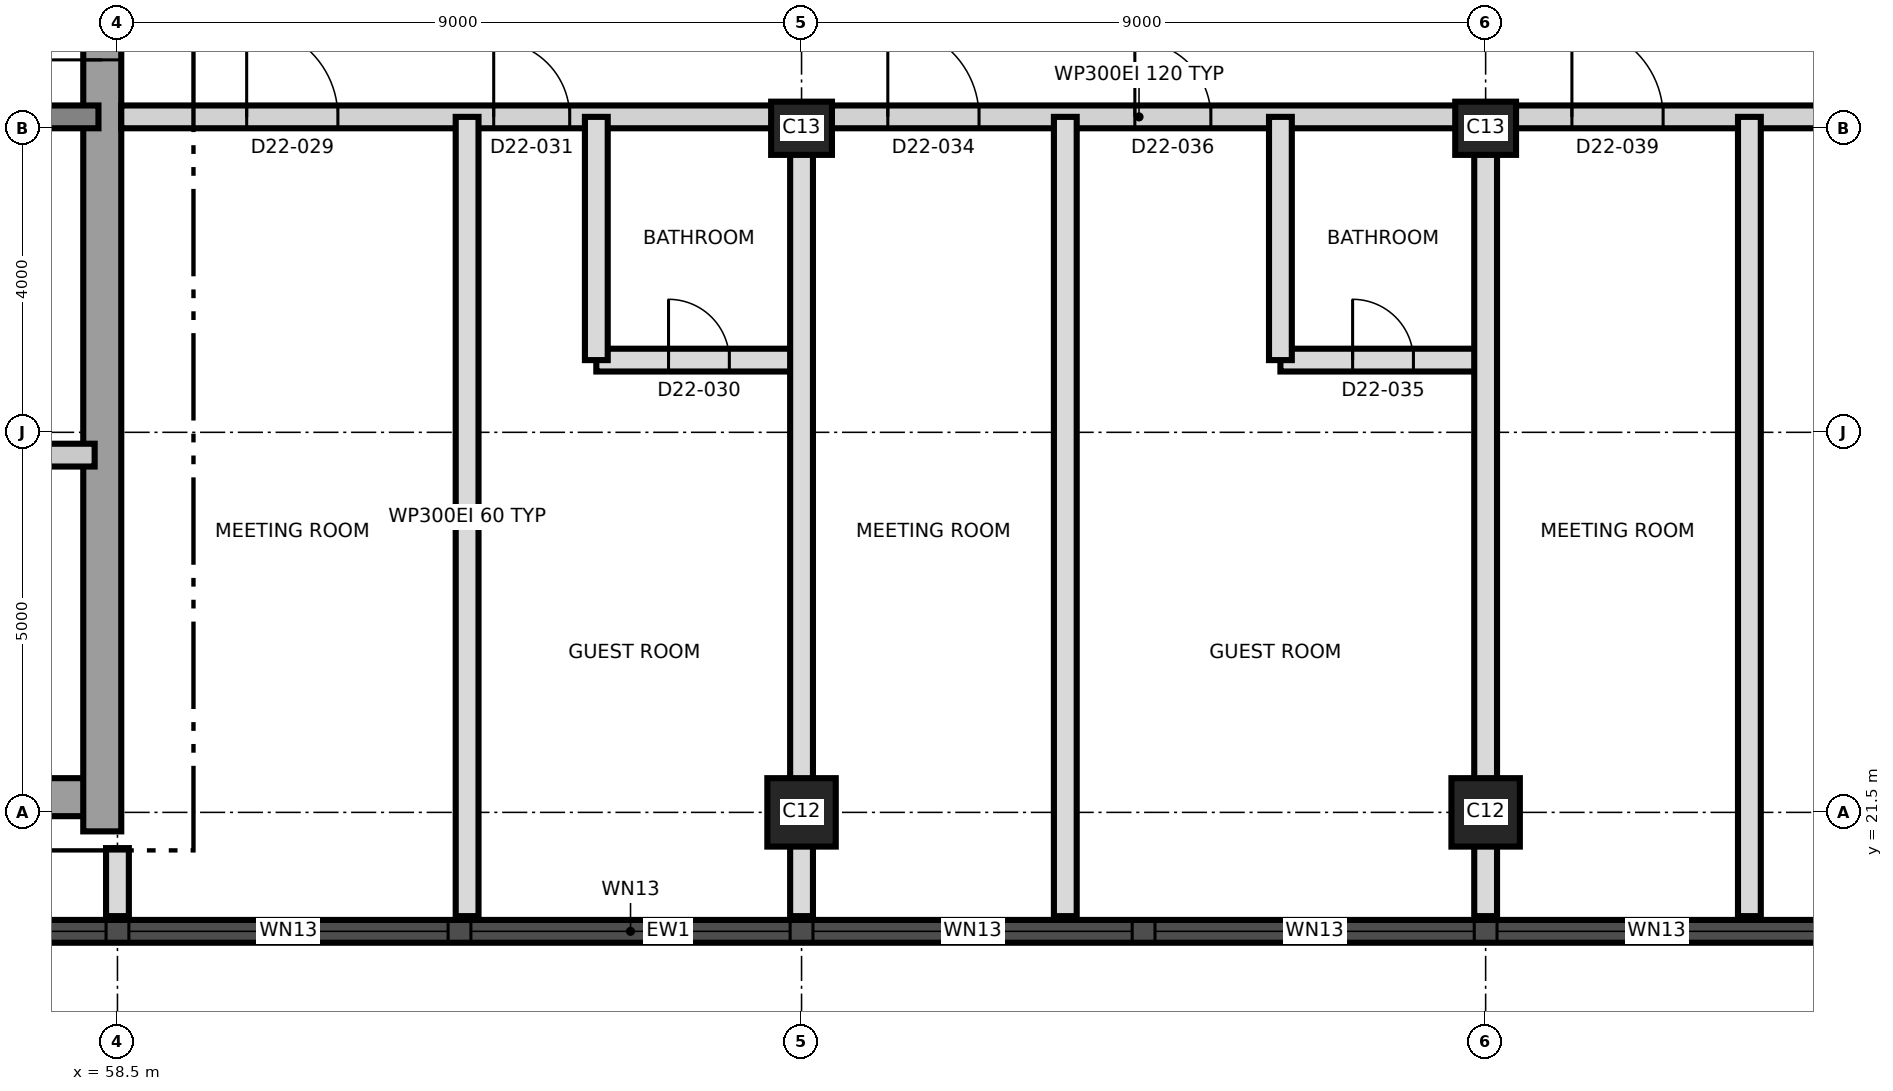
"""IFC4 building model, lengths in metres.
Left out: names, types, materials, properties, quantities, classifications, styles, units other than length and angle.
Written with IfcOpenShell. Run it as: python <this file> out.ifc"""

import sys

from ifc_helpers import new_model, si_unit, direction, frame, frame_2d, origin, origin_2d, place, context, subcontext, project, spatial, rectangle, extrude, element, fill, save


model = new_model("IFC4")
c1 = context("Model", 3, precision=1e-05, world=origin(), true_north=direction((0.0, 1.0)))
c2 = subcontext(c1, "Body", "Model", "MODEL_VIEW")
j1 = project(units=[si_unit("LENGTHUNIT", "METRE"), si_unit("PLANEANGLEUNIT", "RADIAN")], contexts=[c1])
p1 = place(None, origin())
s1 = spatial("IfcSite", under=j1, at=p1, CompositionType="ELEMENT")
p2 = place(p1, origin())
s2 = spatial("IfcBuilding", under=s1, at=p2, CompositionType="ELEMENT")
p3 = place(p2, frame((0.0, 0.0, 203.2)))
s3 = spatial("IfcBuildingStorey", under=s2, at=p3, CompositionType="ELEMENT", Elevation=203.2)
p4 = place(p3, frame((31.25, 21.7, 0.0), z_axis=(0.0, 0.0, 1.0), x_axis=(1.0, 0.0, 0.0)))
e1 = element("IfcWall", 1, at=p4, inside=s3, PredefinedType="SHEAR", context=c2, shape_type="SweptSolid", body=[
    extrude(rectangle(XDim=27.0, YDim=0.5, at=frame_2d((13.5, 0.0))), origin(), (0.0, 0.0, 1.0), 3.7),
])
p5 = place(p3, frame((58.3, 21.25, 0.0), z_axis=(0.0, 0.0, 1.0), x_axis=(0.0, 1.0, 0.0)))
e2 = element("IfcWall", 2, at=p5, inside=s3, PredefinedType="SHEAR", context=c2, shape_type="SweptSolid", body=[
    extrude(rectangle(XDim=18.5, YDim=0.5, at=frame_2d((9.25, 0.0))), origin(), (0.0, 0.0, 1.0), 3.7),
])
p6 = place(p5, frame((10.15, 0.0, 0.0)))
e3 = element("IfcOpeningElement", 3, at=p6, cuts=e2, PredefinedType="OPENING", context=c2, shape_type="SweptSolid", body=[
    extrude(rectangle(XDim=1.2, YDim=2.1, at=frame_2d((0.6, 1.05))), frame((0.0, 0.26, 0.0), z_axis=(0.0, -1.0, 0.0), x_axis=(1.0, 0.0, 0.0)), (0.0, 0.0, 1.0), 0.52),
])
p7 = place(p3, frame((31.75, 30.65, 0.0), z_axis=(0.0, 0.0, 1.0), x_axis=(1.0, 0.0, 0.0)))
e4 = element("IfcWall", 4, at=p7, inside=s3, PredefinedType="SHEAR", context=c2, shape_type="SweptSolid", body=[
    extrude(rectangle(XDim=26.5, YDim=0.3, at=frame_2d((13.25, 0.0))), origin(), (0.0, 0.0, 1.0), 3.7),
])
p8 = place(p7, frame((24.75, 0.0, 0.0)))
e5 = element("IfcOpeningElement", 5, at=p8, cuts=e4, PredefinedType="OPENING", context=c2, shape_type="SweptSolid", body=[
    extrude(rectangle(XDim=1.0, YDim=2.1, at=frame_2d((0.5, 1.05))), frame((0.0, 0.16, 0.0), z_axis=(0.0, -1.0, 0.0), x_axis=(1.0, 0.0, 0.0)), (0.0, 0.0, 1.0), 0.32),
])
p9 = place(p7, frame((4.05, 0.0, 0.0)))
e6 = element("IfcOpeningElement", 6, at=p9, cuts=e4, PredefinedType="OPENING", context=c2, shape_type="SweptSolid", body=[
    extrude(rectangle(XDim=1.0, YDim=2.1, at=frame_2d((0.5, 1.05))), frame((0.0, 0.16, 0.0), z_axis=(0.0, -1.0, 0.0), x_axis=(1.0, 0.0, 0.0)), (0.0, 0.0, 1.0), 0.32),
])
for number, where, z_axis, x_axis in (
    (7, (67.5, 21.5, 0.0), (0.0, 0.0, 1.0), (1.0, 0.0, 0.0)),
    (8, (76.5, 21.5, 0.0), (0.0, 0.0, 1.0), (1.0, 0.0, 0.0)),
):
    element("IfcColumn", number, at=place(p3, frame(where, z_axis=z_axis, x_axis=x_axis)), inside=s3, PredefinedType="COLUMN", context=c2, shape_type="SweptSolid", body=[
        extrude(rectangle(XDim=0.9, YDim=0.9, at=origin_2d()), origin(), (0.0, 0.0, 1.0), 3.7),
    ])
for number, where, z_axis, x_axis in (
    (9, (67.5, 30.5, 0.0), (0.0, 0.0, 1.0), (1.0, 0.0, 0.0)),
    (10, (76.5, 30.5, 0.0), (0.0, 0.0, 1.0), (1.0, 0.0, 0.0)),
):
    element("IfcColumn", number, at=place(p3, frame(where, z_axis=z_axis, x_axis=x_axis)), inside=s3, PredefinedType="COLUMN", context=c2, shape_type="SweptSolid", body=[
        extrude(rectangle(XDim=0.8, YDim=0.7, at=origin_2d()), origin(), (0.0, 0.0, 1.0), 3.7),
    ])
p10 = place(p3, frame((44.01, 19.935, 0.0), z_axis=(0.0, 0.0, 1.0), x_axis=(1.0, 0.0, 0.0)))
e11 = element("IfcWall", 11, at=p10, inside=s3, PredefinedType="SOLIDWALL", context=c2, shape_type="SweptSolid", body=[
    extrude(rectangle(XDim=43.477, YDim=0.3, at=frame_2d((21.738, 0.0))), origin(), (0.0, 0.0, 1.0), 3.4),
])
p11 = place(p10, frame((1.845, 0.0, 0.3)))
e12 = element("IfcOpeningElement", 12, at=p11, cuts=e11, PredefinedType="OPENING", context=c2, shape_type="SweptSolid", body=[
    extrude(rectangle(XDim=1.8, YDim=2.4, at=frame_2d((0.9, 1.2))), frame((0.0, 0.16, 0.0), z_axis=(0.0, -1.0, 0.0), x_axis=(1.0, 0.0, 0.0)), (0.0, 0.0, 1.0), 0.32),
])
p12 = place(p10, frame((5.64, 0.0, 0.9)))
e13 = element("IfcOpeningElement", 13, at=p12, cuts=e11, PredefinedType="OPENING", context=c2, shape_type="SweptSolid", body=[
    extrude(rectangle(XDim=4.2, YDim=1.7, at=frame_2d((2.1, 0.85))), frame((0.0, 0.16, 0.0), z_axis=(0.0, -1.0, 0.0), x_axis=(1.0, 0.0, 0.0)), (0.0, 0.0, 1.0), 0.32),
])
p13 = place(p10, frame((10.14, 0.0, 0.9)))
e14 = element("IfcOpeningElement", 14, at=p13, cuts=e11, PredefinedType="OPENING", context=c2, shape_type="SweptSolid", body=[
    extrude(rectangle(XDim=4.2, YDim=1.7, at=frame_2d((2.1, 0.85))), frame((0.0, 0.16, 0.0), z_axis=(0.0, -1.0, 0.0), x_axis=(1.0, 0.0, 0.0)), (0.0, 0.0, 1.0), 0.32),
])
p14 = place(p10, frame((14.64, 0.0, 0.9)))
e15 = element("IfcOpeningElement", 15, at=p14, cuts=e11, PredefinedType="OPENING", context=c2, shape_type="SweptSolid", body=[
    extrude(rectangle(XDim=4.2, YDim=1.7, at=frame_2d((2.1, 0.85))), frame((0.0, 0.16, 0.0), z_axis=(0.0, -1.0, 0.0), x_axis=(1.0, 0.0, 0.0)), (0.0, 0.0, 1.0), 0.32),
])
p15 = place(p10, frame((19.14, 0.0, 0.9)))
e16 = element("IfcOpeningElement", 16, at=p15, cuts=e11, PredefinedType="OPENING", context=c2, shape_type="SweptSolid", body=[
    extrude(rectangle(XDim=4.2, YDim=1.7, at=frame_2d((2.1, 0.85))), frame((0.0, 0.16, 0.0), z_axis=(0.0, -1.0, 0.0), x_axis=(1.0, 0.0, 0.0)), (0.0, 0.0, 1.0), 0.32),
])
p16 = place(p10, frame((23.64, 0.0, 0.9)))
e17 = element("IfcOpeningElement", 17, at=p16, cuts=e11, PredefinedType="OPENING", context=c2, shape_type="SweptSolid", body=[
    extrude(rectangle(XDim=4.2, YDim=1.7, at=frame_2d((2.1, 0.85))), frame((0.0, 0.16, 0.0), z_axis=(0.0, -1.0, 0.0), x_axis=(1.0, 0.0, 0.0)), (0.0, 0.0, 1.0), 0.32),
])
p17 = place(p10, frame((28.14, 0.0, 0.9)))
e18 = element("IfcOpeningElement", 18, at=p17, cuts=e11, PredefinedType="OPENING", context=c2, shape_type="SweptSolid", body=[
    extrude(rectangle(XDim=4.2, YDim=1.7, at=frame_2d((2.1, 0.85))), frame((0.0, 0.16, 0.0), z_axis=(0.0, -1.0, 0.0), x_axis=(1.0, 0.0, 0.0)), (0.0, 0.0, 1.0), 0.32),
])
p18 = place(p10, frame((32.64, 0.0, 0.9)))
e19 = element("IfcOpeningElement", 19, at=p18, cuts=e11, PredefinedType="OPENING", context=c2, shape_type="SweptSolid", body=[
    extrude(rectangle(XDim=4.2, YDim=1.7, at=frame_2d((2.1, 0.85))), frame((0.0, 0.16, 0.0), z_axis=(0.0, -1.0, 0.0), x_axis=(1.0, 0.0, 0.0)), (0.0, 0.0, 1.0), 0.32),
])
p19 = place(p10, frame((37.14, 0.0, 0.9)))
e20 = element("IfcOpeningElement", 20, at=p19, cuts=e11, PredefinedType="OPENING", context=c2, shape_type="SweptSolid", body=[
    extrude(rectangle(XDim=4.2, YDim=1.7, at=frame_2d((2.1, 0.85))), frame((0.0, 0.16, 0.0), z_axis=(0.0, -1.0, 0.0), x_axis=(1.0, 0.0, 0.0)), (0.0, 0.0, 1.0), 0.32),
])
p20 = place(p3, frame((55.8, 26.2, 0.0), z_axis=(0.0, 0.0, 1.0), x_axis=(1.0, 0.0, 0.0)))
e21 = element("IfcWall", 21, at=p20, inside=s3, PredefinedType="PARTITIONING", context=c2, shape_type="SweptSolid", body=[
    extrude(rectangle(XDim=2.4, YDim=0.3, at=frame_2d((1.2, 0.0))), origin(), (0.0, 0.0, 1.0), 3.4),
])
p21 = place(p20, frame((0.75, 0.0, 0.0)))
e22 = element("IfcOpeningElement", 22, at=p21, cuts=e21, PredefinedType="OPENING", context=c2, shape_type="SweptSolid", body=[
    extrude(rectangle(XDim=0.9, YDim=2.1, at=frame_2d((0.45, 1.05))), frame((0.0, 0.16, 0.0), z_axis=(0.0, -1.0, 0.0), x_axis=(1.0, 0.0, 0.0)), (0.0, 0.0, 1.0), 0.32),
])
p22 = place(p3, frame((64.8, 27.45, 0.0), z_axis=(0.0, 0.0, 1.0), x_axis=(1.0, 0.0, 0.0)))
e23 = element("IfcWall", 23, at=p22, inside=s3, PredefinedType="PARTITIONING", context=c2, shape_type="SweptSolid", body=[
    extrude(rectangle(XDim=2.7, YDim=0.3, at=frame_2d((1.35, 0.0))), origin(), (0.0, 0.0, 1.0), 3.4),
])
p23 = place(p22, frame((0.95, 0.0, 0.0)))
e24 = element("IfcOpeningElement", 24, at=p23, cuts=e23, PredefinedType="OPENING", context=c2, shape_type="SweptSolid", body=[
    extrude(rectangle(XDim=0.8, YDim=2.1, at=frame_2d((0.4, 1.05))), frame((0.0, 0.16, 0.0), z_axis=(0.0, -1.0, 0.0), x_axis=(1.0, 0.0, 0.0)), (0.0, 0.0, 1.0), 0.32),
])
p24 = place(p3, frame((73.8, 27.45, 0.0), z_axis=(0.0, 0.0, 1.0), x_axis=(1.0, 0.0, 0.0)))
e25 = element("IfcWall", 25, at=p24, inside=s3, PredefinedType="PARTITIONING", context=c2, shape_type="SweptSolid", body=[
    extrude(rectangle(XDim=2.7, YDim=0.3, at=frame_2d((1.35, 0.0))), origin(), (0.0, 0.0, 1.0), 3.4),
])
p25 = place(p24, frame((0.95, 0.0, 0.0)))
e26 = element("IfcOpeningElement", 26, at=p25, cuts=e25, PredefinedType="OPENING", context=c2, shape_type="SweptSolid", body=[
    extrude(rectangle(XDim=0.8, YDim=2.1, at=frame_2d((0.4, 1.05))), frame((0.0, 0.16, 0.0), z_axis=(0.0, -1.0, 0.0), x_axis=(1.0, 0.0, 0.0)), (0.0, 0.0, 1.0), 0.32),
])
p26 = place(p3, frame((58.55, 30.65, 0.0), z_axis=(0.0, 0.0, 1.0), x_axis=(1.0, 0.0, 0.0)))
e27 = element("IfcWall", 27, at=p26, inside=s3, PredefinedType="PARTITIONING", context=c2, shape_type="SweptSolid", body=[
    extrude(rectangle(XDim=26.78, YDim=0.3, at=frame_2d((13.39, 0.0))), origin(), (0.0, 0.0, 1.0), 3.4),
])
p27 = place(p26, frame((1.65, 0.0, 0.0)))
e28 = element("IfcOpeningElement", 28, at=p27, cuts=e27, PredefinedType="OPENING", context=c2, shape_type="SweptSolid", body=[
    extrude(rectangle(XDim=1.2, YDim=2.1, at=frame_2d((0.6, 1.05))), frame((0.0, 0.16, 0.0), z_axis=(0.0, -1.0, 0.0), x_axis=(1.0, 0.0, 0.0)), (0.0, 0.0, 1.0), 0.32),
])
p28 = place(p26, frame((4.9, 0.0, 0.0)))
e29 = element("IfcOpeningElement", 29, at=p28, cuts=e27, PredefinedType="OPENING", context=c2, shape_type="SweptSolid", body=[
    extrude(rectangle(XDim=1.0, YDim=2.1, at=frame_2d((0.5, 1.05))), frame((0.0, 0.16, 0.0), z_axis=(0.0, -1.0, 0.0), x_axis=(1.0, 0.0, 0.0)), (0.0, 0.0, 1.0), 0.32),
])
p29 = place(p26, frame((10.085, 0.0, 0.0)))
e30 = element("IfcOpeningElement", 30, at=p29, cuts=e27, PredefinedType="OPENING", context=c2, shape_type="SweptSolid", body=[
    extrude(rectangle(XDim=1.2, YDim=2.1, at=frame_2d((0.6, 1.05))), frame((0.0, 0.16, 0.0), z_axis=(0.0, -1.0, 0.0), x_axis=(1.0, 0.0, 0.0)), (0.0, 0.0, 1.0), 0.32),
])
p30 = place(p26, frame((13.335, 0.0, 0.0)))
e31 = element("IfcOpeningElement", 31, at=p30, cuts=e27, PredefinedType="OPENING", context=c2, shape_type="SweptSolid", body=[
    extrude(rectangle(XDim=1.0, YDim=2.1, at=frame_2d((0.5, 1.05))), frame((0.0, 0.16, 0.0), z_axis=(0.0, -1.0, 0.0), x_axis=(1.0, 0.0, 0.0)), (0.0, 0.0, 1.0), 0.32),
])
p31 = place(p26, frame((19.085, 0.0, 0.0)))
e32 = element("IfcOpeningElement", 32, at=p31, cuts=e27, PredefinedType="OPENING", context=c2, shape_type="SweptSolid", body=[
    extrude(rectangle(XDim=1.2, YDim=2.1, at=frame_2d((0.6, 1.05))), frame((0.0, 0.16, 0.0), z_axis=(0.0, -1.0, 0.0), x_axis=(1.0, 0.0, 0.0)), (0.0, 0.0, 1.0), 0.32),
])
p32 = place(p26, frame((22.335, 0.0, 0.0)))
e33 = element("IfcOpeningElement", 33, at=p32, cuts=e27, PredefinedType="OPENING", context=c2, shape_type="SweptSolid", body=[
    extrude(rectangle(XDim=1.0, YDim=2.1, at=frame_2d((0.5, 1.05))), frame((0.0, 0.16, 0.0), z_axis=(0.0, -1.0, 0.0), x_axis=(1.0, 0.0, 0.0)), (0.0, 0.0, 1.0), 0.32),
])
p33 = place(p3, frame((58.5, 20.135, 0.0), z_axis=(0.0, 0.0, 1.0), x_axis=(0.0, 1.0, 0.0)))
e34 = element("IfcWall", 34, at=p33, inside=s3, PredefinedType="PARTITIONING", context=c2, shape_type="SweptSolid", body=[
    extrude(rectangle(XDim=0.895, YDim=0.3, at=frame_2d((0.448, 0.0))), origin(), (0.0, 0.0, 1.0), 3.35),
])
p34 = place(p3, frame((63.1, 20.135, 0.0), z_axis=(0.0, 0.0, 1.0), x_axis=(0.0, 1.0, 0.0)))
e35 = element("IfcWall", 35, at=p34, inside=s3, PredefinedType="PARTITIONING", context=c2, shape_type="SweptSolid", body=[
    extrude(rectangle(XDim=10.515, YDim=0.3, at=frame_2d((5.257, 0.0))), origin(), (0.0, 0.0, 1.0), 3.35),
])
p35 = place(p3, frame((64.8, 27.45, 0.0), z_axis=(0.0, 0.0, 1.0), x_axis=(0.0, 1.0, 0.0)))
e36 = element("IfcWall", 36, at=p35, inside=s3, PredefinedType="PARTITIONING", context=c2, shape_type="SweptSolid", body=[
    extrude(rectangle(XDim=3.2, YDim=0.3, at=frame_2d((1.6, 0.0))), origin(), (0.0, 0.0, 1.0), 3.4),
])
for number, where, z_axis, x_axis in (
    (37, (67.5, 20.135, 0.0), (0.0, 0.0, 1.0), (0.0, 1.0, 0.0)),
    (38, (70.97, 20.135, 0.0), (0.0, 0.0, 1.0), (0.0, 1.0, 0.0)),
):
    element("IfcWall", number, at=place(p3, frame(where, z_axis=z_axis, x_axis=x_axis)), inside=s3, PredefinedType="PARTITIONING", context=c2, shape_type="SweptSolid", body=[
        extrude(rectangle(XDim=10.515, YDim=0.3, at=frame_2d((5.257, 0.0))), origin(), (0.0, 0.0, 1.0), 3.35),
    ])
p36 = place(p3, frame((73.8, 27.45, 0.0), z_axis=(0.0, 0.0, 1.0), x_axis=(0.0, 1.0, 0.0)))
e39 = element("IfcWall", 39, at=p36, inside=s3, PredefinedType="PARTITIONING", context=c2, shape_type="SweptSolid", body=[
    extrude(rectangle(XDim=3.2, YDim=0.3, at=frame_2d((1.6, 0.0))), origin(), (0.0, 0.0, 1.0), 3.4),
])
for number, where, z_axis, x_axis in (
    (40, (76.5, 20.135, 0.0), (0.0, 0.0, 1.0), (0.0, 1.0, 0.0)),
    (41, (79.97, 20.135, 0.0), (0.0, 0.0, 1.0), (0.0, 1.0, 0.0)),
):
    element("IfcWall", number, at=place(p3, frame(where, z_axis=z_axis, x_axis=x_axis)), inside=s3, PredefinedType="PARTITIONING", context=c2, shape_type="SweptSolid", body=[
        extrude(rectangle(XDim=10.515, YDim=0.3, at=frame_2d((5.257, 0.0))), origin(), (0.0, 0.0, 1.0), 3.35),
    ])
p37 = place(p13, origin())
e42 = element("IfcWindow", 42, at=p37, inside=s3, PartitioningType="SINGLE_PANEL", PredefinedType="WINDOW", context=c2, shape_type="SweptSolid", body=[
    extrude(rectangle(XDim=4.2, YDim=1.7, at=frame_2d((2.1, 0.85))), frame((0.0, 0.03, 0.0), z_axis=(0.0, -1.0, 0.0), x_axis=(1.0, 0.0, 0.0)), (0.0, 0.0, 1.0), 0.06),
])
fill(e14, e42)
p38 = place(p14, origin())
e43 = element("IfcWindow", 43, at=p38, inside=s3, PartitioningType="SINGLE_PANEL", PredefinedType="WINDOW", context=c2, shape_type="SweptSolid", body=[
    extrude(rectangle(XDim=4.2, YDim=1.7, at=frame_2d((2.1, 0.85))), frame((0.0, 0.03, 0.0), z_axis=(0.0, -1.0, 0.0), x_axis=(1.0, 0.0, 0.0)), (0.0, 0.0, 1.0), 0.06),
])
fill(e15, e43)
p39 = place(p15, origin())
e44 = element("IfcWindow", 44, at=p39, inside=s3, PartitioningType="SINGLE_PANEL", PredefinedType="WINDOW", context=c2, shape_type="SweptSolid", body=[
    extrude(rectangle(XDim=4.2, YDim=1.7, at=frame_2d((2.1, 0.85))), frame((0.0, 0.03, 0.0), z_axis=(0.0, -1.0, 0.0), x_axis=(1.0, 0.0, 0.0)), (0.0, 0.0, 1.0), 0.06),
])
fill(e16, e44)
p40 = place(p16, origin())
e45 = element("IfcWindow", 45, at=p40, inside=s3, PartitioningType="SINGLE_PANEL", PredefinedType="WINDOW", context=c2, shape_type="SweptSolid", body=[
    extrude(rectangle(XDim=4.2, YDim=1.7, at=frame_2d((2.1, 0.85))), frame((0.0, 0.03, 0.0), z_axis=(0.0, -1.0, 0.0), x_axis=(1.0, 0.0, 0.0)), (0.0, 0.0, 1.0), 0.06),
])
fill(e17, e45)
p41 = place(p17, origin())
e46 = element("IfcWindow", 46, at=p41, inside=s3, PartitioningType="SINGLE_PANEL", PredefinedType="WINDOW", context=c2, shape_type="SweptSolid", body=[
    extrude(rectangle(XDim=4.2, YDim=1.7, at=frame_2d((2.1, 0.85))), frame((0.0, 0.03, 0.0), z_axis=(0.0, -1.0, 0.0), x_axis=(1.0, 0.0, 0.0)), (0.0, 0.0, 1.0), 0.06),
])
fill(e18, e46)
p42 = place(p18, origin())
e47 = element("IfcWindow", 47, at=p42, inside=s3, PartitioningType="SINGLE_PANEL", PredefinedType="WINDOW", context=c2, shape_type="SweptSolid", body=[
    extrude(rectangle(XDim=4.2, YDim=1.7, at=frame_2d((2.1, 0.85))), frame((0.0, 0.03, 0.0), z_axis=(0.0, -1.0, 0.0), x_axis=(1.0, 0.0, 0.0)), (0.0, 0.0, 1.0), 0.06),
])
fill(e19, e47)
p43 = place(p6, origin())
e48 = element("IfcDoor", 48, at=p43, inside=s3, OperationType="SINGLE_SWING_LEFT", PredefinedType="DOOR", context=c2, shape_type="SweptSolid", body=[
    extrude(rectangle(XDim=1.2, YDim=2.1, at=frame_2d((0.6, 1.05))), frame((0.0, 0.025, 0.0), z_axis=(0.0, -1.0, 0.0), x_axis=(1.0, 0.0, 0.0)), (0.0, 0.0, 1.0), 0.05),
])
fill(e3, e48)
p44 = place(p27, origin())
e49 = element("IfcDoor", 49, at=p44, inside=s3, OperationType="SINGLE_SWING_LEFT", PredefinedType="DOOR", context=c2, shape_type="SweptSolid", body=[
    extrude(rectangle(XDim=1.2, YDim=2.1, at=frame_2d((0.6, 1.05))), frame((0.0, 0.025, 0.0), z_axis=(0.0, -1.0, 0.0), x_axis=(1.0, 0.0, 0.0)), (0.0, 0.0, 1.0), 0.05),
])
fill(e28, e49)
p45 = place(p23, origin())
e50 = element("IfcDoor", 50, at=p45, inside=s3, OperationType="SINGLE_SWING_RIGHT", PredefinedType="DOOR", context=c2, shape_type="SweptSolid", body=[
    extrude(rectangle(XDim=0.8, YDim=2.1, at=frame_2d((0.4, 1.05))), frame((0.0, 0.025, 0.0), z_axis=(0.0, -1.0, 0.0), x_axis=(1.0, 0.0, 0.0)), (0.0, 0.0, 1.0), 0.05),
])
fill(e24, e50)
p46 = place(p28, origin())
e51 = element("IfcDoor", 51, at=p46, inside=s3, OperationType="SINGLE_SWING_LEFT", PredefinedType="DOOR", context=c2, shape_type="SweptSolid", body=[
    extrude(rectangle(XDim=1.0, YDim=2.1, at=frame_2d((0.5, 1.05))), frame((0.0, 0.025, 0.0), z_axis=(0.0, -1.0, 0.0), x_axis=(1.0, 0.0, 0.0)), (0.0, 0.0, 1.0), 0.05),
])
fill(e29, e51)
p47 = place(p29, origin())
e52 = element("IfcDoor", 52, at=p47, inside=s3, OperationType="SINGLE_SWING_RIGHT", PredefinedType="DOOR", context=c2, shape_type="SweptSolid", body=[
    extrude(rectangle(XDim=1.2, YDim=2.1, at=frame_2d((0.6, 1.05))), frame((0.0, 0.025, 0.0), z_axis=(0.0, -1.0, 0.0), x_axis=(1.0, 0.0, 0.0)), (0.0, 0.0, 1.0), 0.05),
])
fill(e30, e52)
p48 = place(p25, origin())
e53 = element("IfcDoor", 53, at=p48, inside=s3, OperationType="SINGLE_SWING_LEFT", PredefinedType="DOOR", context=c2, shape_type="SweptSolid", body=[
    extrude(rectangle(XDim=0.8, YDim=2.1, at=frame_2d((0.4, 1.05))), frame((0.0, 0.025, 0.0), z_axis=(0.0, -1.0, 0.0), x_axis=(1.0, 0.0, 0.0)), (0.0, 0.0, 1.0), 0.05),
])
fill(e26, e53)
p49 = place(p30, origin())
e54 = element("IfcDoor", 54, at=p49, inside=s3, OperationType="SINGLE_SWING_LEFT", PredefinedType="DOOR", context=c2, shape_type="SweptSolid", body=[
    extrude(rectangle(XDim=1.0, YDim=2.1, at=frame_2d((0.5, 1.05))), frame((0.0, 0.025, 0.0), z_axis=(0.0, -1.0, 0.0), x_axis=(1.0, 0.0, 0.0)), (0.0, 0.0, 1.0), 0.05),
])
fill(e31, e54)
p50 = place(p31, origin())
e55 = element("IfcDoor", 55, at=p50, inside=s3, OperationType="SINGLE_SWING_LEFT", PredefinedType="DOOR", context=c2, shape_type="SweptSolid", body=[
    extrude(rectangle(XDim=1.2, YDim=2.1, at=frame_2d((0.6, 1.05))), frame((0.0, 0.025, 0.0), z_axis=(0.0, -1.0, 0.0), x_axis=(1.0, 0.0, 0.0)), (0.0, 0.0, 1.0), 0.05),
])
fill(e32, e55)
save(model, sys.argv[1])
